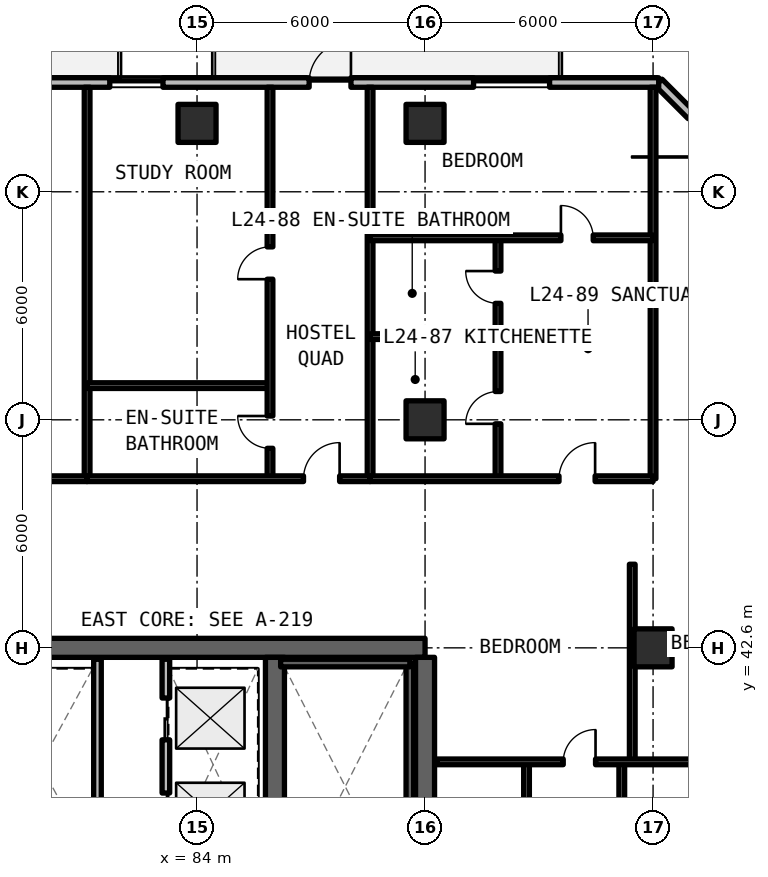
"""IFC4 building model, lengths in metres.
Left out: names, types, materials, properties, quantities, classifications, styles, units other than length and angle.
Written with IfcOpenShell. Run it as: python <this file> out.ifc"""

import sys

from ifc_helpers import new_model, si_unit, direction, frame, frame_2d, origin, origin_2d, place, context, subcontext, project, spatial, rectangle, extrude, element, fill, save


model = new_model("IFC4")
c1 = context("Model", 3, precision=1e-05, world=origin(), true_north=direction((0.0, 1.0)))
c2 = subcontext(c1, "Body", "Model", "MODEL_VIEW")
j1 = project(units=[si_unit("LENGTHUNIT", "METRE"), si_unit("PLANEANGLEUNIT", "RADIAN")], contexts=[c1])
p1 = place(None, origin())
s1 = spatial("IfcSite", under=j1, at=p1, CompositionType="ELEMENT")
p2 = place(p1, origin())
s2 = spatial("IfcBuilding", under=s1, at=p2, CompositionType="ELEMENT")
p3 = place(p2, frame((0.0, 0.0, 88.77)))
s3 = spatial("IfcBuildingStorey", under=s2, at=p3, CompositionType="ELEMENT", Elevation=88.77)
p4 = place(p3, frame((90.0, 42.6, 0.0), z_axis=(0.0, 0.0, 1.0), x_axis=(-1.0, 0.0, 0.0)))
e1 = element("IfcWall", 1, at=p4, inside=s3, PredefinedType="SHEAR", context=c2, shape_type="SweptSolid", body=[
    extrude(rectangle(XDim=12.0, YDim=0.5, at=frame_2d((6.0, 0.0))), origin(), (0.0, 0.0, 1.0), 3.3),
])
p5 = place(p3, frame((90.0, 24.85, 0.0), z_axis=(0.0, 0.0, 1.0), x_axis=(0.0, 1.0, 0.0)))
e2 = element("IfcWall", 2, at=p5, inside=s3, PredefinedType="SHEAR", context=c2, shape_type="SweptSolid", body=[
    extrude(rectangle(XDim=17.5, YDim=0.5, at=frame_2d((8.75, 0.0))), origin(), (0.0, 0.0, 1.0), 3.3),
])
p6 = place(p3, frame((86.05, 24.85, 0.0), z_axis=(0.0, 0.0, 1.0), x_axis=(0.0, 1.0, 0.0)))
e3 = element("IfcWall", 3, at=p6, inside=s3, PredefinedType="SHEAR", context=c2, shape_type="SweptSolid", body=[
    extrude(rectangle(XDim=17.5, YDim=0.5, at=frame_2d((8.75, 0.0))), origin(), (0.0, 0.0, 1.0), 3.3),
])
p7 = place(p6, frame((0.4, 0.0, 0.0)))
e4 = element("IfcOpeningElement", 4, at=p7, cuts=e3, PredefinedType="OPENING", context=c2, shape_type="SweptSolid", body=[
    extrude(rectangle(XDim=1.15, YDim=2.15, at=frame_2d((0.575, 1.075))), frame((0.0, 0.26, 0.0), z_axis=(0.0, -1.0, 0.0), x_axis=(1.0, 0.0, 0.0)), (0.0, 0.0, 1.0), 0.52),
])
p8 = place(p6, frame((9.6, 0.0, 0.0)))
e5 = element("IfcOpeningElement", 5, at=p8, cuts=e3, PredefinedType="OPENING", context=c2, shape_type="SweptSolid", body=[
    extrude(rectangle(XDim=1.15, YDim=2.15, at=frame_2d((0.575, 1.075))), frame((0.0, 0.26, 0.0), z_axis=(0.0, -1.0, 0.0), x_axis=(1.0, 0.0, 0.0)), (0.0, 0.0, 1.0), 0.52),
])
for number, where, z_axis, x_axis in (
    (6, (96.0, 42.6, 0.0), (0.0, 0.0, 1.0), (1.0, 0.0, 0.0)),
    (7, (90.0, 48.6, 0.0), (0.0, 0.0, 1.0), (1.0, 0.0, 0.0)),
    (8, (84.0, 56.4, 0.0), (0.0, 0.0, 1.0), (1.0, 0.0, 0.0)),
    (9, (90.0, 56.4, 0.0), (0.0, 0.0, 1.0), (1.0, 0.0, 0.0)),
):
    element("IfcColumn", number, at=place(p3, frame(where, z_axis=z_axis, x_axis=x_axis)), inside=s3, PredefinedType="COLUMN", context=c2, shape_type="SweptSolid", body=[
        extrude(rectangle(XDim=1.0, YDim=1.0, at=origin_2d()), origin(), (0.0, 0.0, 1.0), 3.3),
    ])
p9 = place(p3, frame((100.275, 53.348, 0.0), z_axis=(0.0, 0.0, 1.0), x_axis=(-0.70708586489, 0.707127696864, 0.0)))
e10 = element("IfcWall", 10, at=p9, inside=s3, PredefinedType="SOLIDWALL", context=c2, shape_type="SweptSolid", body=[
    extrude(rectangle(XDim=5.836, YDim=0.25, at=frame_2d((2.918, 0.0))), origin(), (0.0, 0.0, 1.0), 3.08),
])
p10 = place(p9, frame((1.218, 0.0, 0.78)))
e11 = element("IfcOpeningElement", 11, at=p10, cuts=e10, PredefinedType="OPENING", context=c2, shape_type="SweptSolid", body=[
    extrude(rectangle(XDim=3.4, YDim=1.66, at=frame_2d((1.7, 0.83))), frame((0.0, 0.135, 0.0), z_axis=(0.0, -1.0, 0.0), x_axis=(1.0, 0.0, 0.0)), (0.0, 0.0, 1.0), 0.27),
])
p11 = place(p3, frame((96.148, 57.475, 0.0), z_axis=(0.0, 0.0, 1.0), x_axis=(-1.0, 0.0, 0.0)))
e12 = element("IfcWall", 12, at=p11, inside=s3, PredefinedType="SOLIDWALL", context=c2, shape_type="SweptSolid", body=[
    extrude(rectangle(XDim=44.023, YDim=0.25, at=frame_2d((22.012, 0.0))), origin(), (0.0, 0.0, 1.0), 3.08),
])
p12 = place(p11, frame((27.298, 0.0, 0.0)))
e13 = element("IfcOpeningElement", 13, at=p12, cuts=e12, PredefinedType="OPENING", context=c2, shape_type="SweptSolid", body=[
    extrude(rectangle(XDim=1.1, YDim=2.15, at=frame_2d((0.55, 1.075))), frame((0.0, 0.135, 0.0), z_axis=(0.0, -1.0, 0.0), x_axis=(1.0, 0.0, 0.0)), (0.0, 0.0, 1.0), 0.27),
])
p13 = place(p11, frame((19.948, 0.0, 0.0)))
e14 = element("IfcOpeningElement", 14, at=p13, cuts=e12, PredefinedType="OPENING", context=c2, shape_type="SweptSolid", body=[
    extrude(rectangle(XDim=1.1, YDim=2.15, at=frame_2d((0.55, 1.075))), frame((0.0, 0.135, 0.0), z_axis=(0.0, -1.0, 0.0), x_axis=(1.0, 0.0, 0.0)), (0.0, 0.0, 1.0), 0.27),
])
p14 = place(p11, frame((8.098, 0.0, 0.0)))
e15 = element("IfcOpeningElement", 15, at=p14, cuts=e12, PredefinedType="OPENING", context=c2, shape_type="SweptSolid", body=[
    extrude(rectangle(XDim=1.1, YDim=2.15, at=frame_2d((0.55, 1.075))), frame((0.0, 0.135, 0.0), z_axis=(0.0, -1.0, 0.0), x_axis=(1.0, 0.0, 0.0)), (0.0, 0.0, 1.0), 0.27),
])
p15 = place(p11, frame((39.336, 0.0, 0.78)))
e16 = element("IfcOpeningElement", 16, at=p15, cuts=e12, PredefinedType="OPENING", context=c2, shape_type="SweptSolid", body=[
    extrude(rectangle(XDim=2.0, YDim=1.66, at=frame_2d((1.0, 0.83))), frame((0.0, 0.135, 0.0), z_axis=(0.0, -1.0, 0.0), x_axis=(1.0, 0.0, 0.0)), (0.0, 0.0, 1.0), 0.27),
])
p16 = place(p11, frame((33.345, 0.0, 0.78)))
e17 = element("IfcOpeningElement", 17, at=p16, cuts=e12, PredefinedType="OPENING", context=c2, shape_type="SweptSolid", body=[
    extrude(rectangle(XDim=2.0, YDim=1.66, at=frame_2d((1.0, 0.83))), frame((0.0, 0.135, 0.0), z_axis=(0.0, -1.0, 0.0), x_axis=(1.0, 0.0, 0.0)), (0.0, 0.0, 1.0), 0.27),
])
p17 = place(p11, frame((13.044, 0.0, 0.78)))
e18 = element("IfcOpeningElement", 18, at=p17, cuts=e12, PredefinedType="OPENING", context=c2, shape_type="SweptSolid", body=[
    extrude(rectangle(XDim=1.4, YDim=1.65, at=frame_2d((0.7, 0.825))), frame((0.0, 0.135, 0.0), z_axis=(0.0, -1.0, 0.0), x_axis=(1.0, 0.0, 0.0)), (0.0, 0.0, 1.0), 0.27),
])
p18 = place(p11, frame((2.871, 0.0, 0.78)))
e19 = element("IfcOpeningElement", 19, at=p18, cuts=e12, PredefinedType="OPENING", context=c2, shape_type="SweptSolid", body=[
    extrude(rectangle(XDim=2.0, YDim=1.66, at=frame_2d((1.0, 0.83))), frame((0.0, 0.135, 0.0), z_axis=(0.0, -1.0, 0.0), x_axis=(1.0, 0.0, 0.0)), (0.0, 0.0, 1.0), 0.27),
])
p19 = place(p3, frame((83.18, 36.88, 0.0), z_axis=(0.0, 0.0, 1.0), x_axis=(0.0, 1.0, 0.0)))
e20 = element("IfcWall", 20, at=p19, inside=s3, PredefinedType="SOLIDWALL", context=c2, shape_type="SweptSolid", body=[
    extrude(rectangle(XDim=5.42, YDim=0.2, at=frame_2d((2.71, 0.0))), origin(), (0.0, 0.0, 1.0), 2.35),
])
p20 = place(p19, frame((0.8, 0.0, 0.0)))
e21 = element("IfcOpeningElement", 21, at=p20, cuts=e20, PredefinedType="OPENING", context=c2, shape_type="SweptSolid", body=[
    extrude(rectangle(XDim=1.1, YDim=2.2, at=frame_2d((0.55, 1.1))), frame((0.0, 0.11, 0.0), z_axis=(0.0, -1.0, 0.0), x_axis=(1.0, 0.0, 0.0)), (0.0, 0.0, 1.0), 0.22),
])
p21 = place(p19, frame((3.3, 0.0, 0.0)))
e22 = element("IfcOpeningElement", 22, at=p21, cuts=e20, PredefinedType="OPENING", context=c2, shape_type="SweptSolid", body=[
    extrude(rectangle(XDim=1.1, YDim=2.2, at=frame_2d((0.55, 1.1))), frame((0.0, 0.11, 0.0), z_axis=(0.0, -1.0, 0.0), x_axis=(1.0, 0.0, 0.0)), (0.0, 0.0, 1.0), 0.22),
])
p22 = place(p3, frame((81.38, 36.88, 0.0), z_axis=(0.0, 0.0, 1.0), x_axis=(0.0, 1.0, 0.0)))
e23 = element("IfcWall", 23, at=p22, inside=s3, PredefinedType="SOLIDWALL", context=c2, shape_type="SweptSolid", body=[
    extrude(rectangle(XDim=5.42, YDim=0.2, at=frame_2d((2.71, 0.0))), origin(), (0.0, 0.0, 1.0), 2.35),
])
p23 = place(p3, frame((95.177, 22.4, 0.0), z_axis=(0.0, 0.0, 1.0), x_axis=(0.0, 1.0, 0.0)))
e24 = element("IfcWall", 24, at=p23, inside=s3, PredefinedType="PARTITIONING", context=c2, shape_type="SweptSolid", body=[
    extrude(rectangle(XDim=17.2, YDim=0.15, at=frame_2d((8.6, 0.0))), origin(), (0.0, 0.0, 1.0), 2.35),
])
p24 = place(p23, frame((8.175, 0.0, 0.0)))
e25 = element("IfcOpeningElement", 25, at=p24, cuts=e24, PredefinedType="OPENING", context=c2, shape_type="SweptSolid", body=[
    extrude(rectangle(XDim=0.85, YDim=2.1, at=frame_2d((0.425, 1.05))), frame((0.0, 0.085, 0.0), z_axis=(0.0, -1.0, 0.0), x_axis=(1.0, 0.0, 0.0)), (0.0, 0.0, 1.0), 0.17),
])
p25 = place(p3, frame((92.67, 22.4, 0.0), z_axis=(0.0, 0.0, 1.0), x_axis=(0.0, 1.0, 0.0)))
e26 = element("IfcWall", 26, at=p25, inside=s3, PredefinedType="PARTITIONING", context=c2, shape_type="SweptSolid", body=[
    extrude(rectangle(XDim=17.2, YDim=0.15, at=frame_2d((8.6, 0.0))), origin(), (0.0, 0.0, 1.0), 2.35),
])
p26 = place(p25, frame((4.649, 0.0, 0.0)))
e27 = element("IfcOpeningElement", 27, at=p26, cuts=e26, PredefinedType="OPENING", context=c2, shape_type="SweptSolid", body=[
    extrude(rectangle(XDim=0.85, YDim=2.1, at=frame_2d((0.425, 1.05))), frame((0.0, 0.085, 0.0), z_axis=(0.0, -1.0, 0.0), x_axis=(1.0, 0.0, 0.0)), (0.0, 0.0, 1.0), 0.17),
])
p27 = place(p25, frame((13.249, 0.0, 0.0)))
e28 = element("IfcOpeningElement", 28, at=p27, cuts=e26, PredefinedType="OPENING", context=c2, shape_type="SweptSolid", body=[
    extrude(rectangle(XDim=0.85, YDim=2.1, at=frame_2d((0.425, 1.05))), frame((0.0, 0.085, 0.0), z_axis=(0.0, -1.0, 0.0), x_axis=(1.0, 0.0, 0.0)), (0.0, 0.0, 1.0), 0.17),
])
p28 = place(p3, frame((95.452, 39.6, 0.0), z_axis=(0.0, 0.0, 1.0), x_axis=(0.0, 1.0, 0.0)))
e29 = element("IfcWall", 29, at=p28, inside=s3, PredefinedType="PARTITIONING", context=c2, shape_type="SweptSolid", body=[
    extrude(rectangle(XDim=5.2, YDim=0.15, at=frame_2d((2.6, 0.0))), origin(), (0.0, 0.0, 1.0), 2.35),
])
p29 = place(p3, frame((90.32, 39.6, 0.0), z_axis=(0.0, 0.0, 1.0), x_axis=(1.0, 0.0, 0.0)))
e30 = element("IfcWall", 30, at=p29, inside=s3, PredefinedType="PARTITIONING", context=c2, shape_type="SweptSolid", body=[
    extrude(rectangle(XDim=9.87, YDim=0.15, at=frame_2d((4.935, 0.0))), origin(), (0.0, 0.0, 1.0), 2.35),
])
p30 = place(p29, frame((3.316, 0.0, 0.0)))
e31 = element("IfcOpeningElement", 31, at=p30, cuts=e30, PredefinedType="OPENING", context=c2, shape_type="SweptSolid", body=[
    extrude(rectangle(XDim=0.85, YDim=2.1, at=frame_2d((0.425, 1.05))), frame((0.0, 0.085, 0.0), z_axis=(0.0, -1.0, 0.0), x_axis=(1.0, 0.0, 0.0)), (0.0, 0.0, 1.0), 0.17),
])
p31 = place(p29, frame((7.876, 0.0, 0.0)))
e32 = element("IfcOpeningElement", 32, at=p31, cuts=e30, PredefinedType="OPENING", context=c2, shape_type="SweptSolid", body=[
    extrude(rectangle(XDim=0.85, YDim=2.1, at=frame_2d((0.425, 1.05))), frame((0.0, 0.085, 0.0), z_axis=(0.0, -1.0, 0.0), x_axis=(1.0, 0.0, 0.0)), (0.0, 0.0, 1.0), 0.17),
])
for number, where, z_axis, x_axis in (
    (33, (96.0, 47.05, 0.0), (0.0, 0.0, 1.0), (0.0, 1.0, 0.0)),
    (34, (81.107, 47.05, 0.0), (0.0, 0.0, 1.0), (0.0, 1.0, 0.0)),
):
    element("IfcWall", number, at=place(p3, frame(where, z_axis=z_axis, x_axis=x_axis)), inside=s3, PredefinedType="SOLIDWALL", context=c2, shape_type="SweptSolid", body=[
        extrude(rectangle(XDim=10.3, YDim=0.15, at=frame_2d((5.15, 0.0))), origin(), (0.0, 0.0, 1.0), 2.35),
    ])
p32 = place(p3, frame((71.268, 47.05, 0.0), z_axis=(0.0, 0.0, 1.0), x_axis=(1.0, 0.0, 0.0)))
e35 = element("IfcWall", 35, at=p32, inside=s3, PredefinedType="SOLIDWALL", context=c2, shape_type="SweptSolid", body=[
    extrude(rectangle(XDim=9.84, YDim=0.15, at=frame_2d((4.92, 0.0))), origin(), (0.0, 0.0, 1.0), 2.35),
])
p33 = place(p32, frame((4.37, 0.0, 0.0)))
e36 = element("IfcOpeningElement", 36, at=p33, cuts=e35, PredefinedType="OPENING", context=c2, shape_type="SweptSolid", body=[
    extrude(rectangle(XDim=1.1, YDim=2.15, at=frame_2d((0.55, 1.075))), frame((0.0, 0.085, 0.0), z_axis=(0.0, -1.0, 0.0), x_axis=(1.0, 0.0, 0.0)), (0.0, 0.0, 1.0), 0.17),
])
p34 = place(p3, frame((88.554, 47.05, 0.0), z_axis=(0.0, 0.0, 1.0), x_axis=(0.0, 1.0, 0.0)))
e37 = element("IfcWall", 37, at=p34, inside=s3, PredefinedType="SOLIDWALL", context=c2, shape_type="SweptSolid", body=[
    extrude(rectangle(XDim=10.3, YDim=0.15, at=frame_2d((5.15, 0.0))), origin(), (0.0, 0.0, 1.0), 2.35),
])
p35 = place(p3, frame((81.107, 49.5, 0.0), z_axis=(0.0, 0.0, 1.0), x_axis=(1.0, 0.0, 0.0)))
e38 = element("IfcWall", 38, at=p35, inside=s3, PredefinedType="PARTITIONING", context=c2, shape_type="SweptSolid", body=[
    extrude(rectangle(XDim=4.812, YDim=0.15, at=frame_2d((2.406, 0.0))), origin(), (0.0, 0.0, 1.0), 2.35),
])
p36 = place(p3, frame((85.92, 47.05, 0.0), z_axis=(0.0, 0.0, 1.0), x_axis=(0.0, 1.0, 0.0)))
e39 = element("IfcWall", 39, at=p36, inside=s3, PredefinedType="PARTITIONING", context=c2, shape_type="SweptSolid", body=[
    extrude(rectangle(XDim=10.3, YDim=0.15, at=frame_2d((5.15, 0.0))), origin(), (0.0, 0.0, 1.0), 2.35),
])
p37 = place(p36, frame((0.8, 0.0, 0.0)))
e40 = element("IfcOpeningElement", 40, at=p37, cuts=e39, PredefinedType="OPENING", context=c2, shape_type="SweptSolid", body=[
    extrude(rectangle(XDim=0.85, YDim=2.1, at=frame_2d((0.425, 1.05))), frame((0.0, 0.085, 0.0), z_axis=(0.0, -1.0, 0.0), x_axis=(1.0, 0.0, 0.0)), (0.0, 0.0, 1.0), 0.17),
])
p38 = place(p36, frame((5.25, 0.0, 0.0)))
e41 = element("IfcOpeningElement", 41, at=p38, cuts=e39, PredefinedType="OPENING", context=c2, shape_type="SweptSolid", body=[
    extrude(rectangle(XDim=0.85, YDim=2.1, at=frame_2d((0.425, 1.05))), frame((0.0, 0.085, 0.0), z_axis=(0.0, -1.0, 0.0), x_axis=(1.0, 0.0, 0.0)), (0.0, 0.0, 1.0), 0.17),
])
p39 = place(p3, frame((81.107, 47.05, 0.0), z_axis=(0.0, 0.0, 1.0), x_axis=(1.0, 0.0, 0.0)))
e42 = element("IfcWall", 42, at=p39, inside=s3, PredefinedType="SOLIDWALL", context=c2, shape_type="SweptSolid", body=[
    extrude(rectangle(XDim=7.446, YDim=0.15, at=frame_2d((3.723, 0.0))), origin(), (0.0, 0.0, 1.0), 2.35),
])
p40 = place(p39, frame((5.694, 0.0, 0.0)))
e43 = element("IfcOpeningElement", 43, at=p40, cuts=e42, PredefinedType="OPENING", context=c2, shape_type="SweptSolid", body=[
    extrude(rectangle(XDim=0.95, YDim=2.15, at=frame_2d((0.475, 1.075))), frame((0.0, 0.085, 0.0), z_axis=(0.0, -1.0, 0.0), x_axis=(1.0, 0.0, 0.0)), (0.0, 0.0, 1.0), 0.17),
])
p41 = place(p3, frame((88.554, 50.79, 0.0), z_axis=(0.0, 0.0, 1.0), x_axis=(1.0, 0.0, 0.0)))
e44 = element("IfcWall", 44, at=p41, inside=s3, PredefinedType="PARTITIONING", context=c2, shape_type="SweptSolid", body=[
    extrude(rectangle(XDim=3.366, YDim=0.15, at=frame_2d((1.683, 0.0))), origin(), (0.0, 0.0, 1.0), 2.35),
])
p42 = place(p3, frame((91.92, 47.05, 0.0), z_axis=(0.0, 0.0, 1.0), x_axis=(0.0, 1.0, 0.0)))
e45 = element("IfcWall", 45, at=p42, inside=s3, PredefinedType="PARTITIONING", context=c2, shape_type="SweptSolid", body=[
    extrude(rectangle(XDim=6.338, YDim=0.15, at=frame_2d((3.169, 0.0))), origin(), (0.0, 0.0, 1.0), 2.35),
])
p43 = place(p42, frame((1.445, 0.0, 0.0)))
e46 = element("IfcOpeningElement", 46, at=p43, cuts=e45, PredefinedType="OPENING", context=c2, shape_type="SweptSolid", body=[
    extrude(rectangle(XDim=0.85, YDim=2.1, at=frame_2d((0.425, 1.05))), frame((0.0, 0.085, 0.0), z_axis=(0.0, -1.0, 0.0), x_axis=(1.0, 0.0, 0.0)), (0.0, 0.0, 1.0), 0.17),
])
p44 = place(p42, frame((4.614, 0.0, 0.0)))
e47 = element("IfcOpeningElement", 47, at=p44, cuts=e45, PredefinedType="OPENING", context=c2, shape_type="SweptSolid", body=[
    extrude(rectangle(XDim=0.85, YDim=2.1, at=frame_2d((0.425, 1.05))), frame((0.0, 0.085, 0.0), z_axis=(0.0, -1.0, 0.0), x_axis=(1.0, 0.0, 0.0)), (0.0, 0.0, 1.0), 0.17),
])
p45 = place(p3, frame((88.554, 53.388, 0.0), z_axis=(0.0, 0.0, 1.0), x_axis=(1.0, 0.0, 0.0)))
e48 = element("IfcWall", 48, at=p45, inside=s3, PredefinedType="PARTITIONING", context=c2, shape_type="SweptSolid", body=[
    extrude(rectangle(XDim=7.446, YDim=0.15, at=frame_2d((3.723, 0.0))), origin(), (0.0, 0.0, 1.0), 2.35),
])
p46 = place(p45, frame((5.021, 0.0, 0.0)))
e49 = element("IfcOpeningElement", 49, at=p46, cuts=e48, PredefinedType="OPENING", context=c2, shape_type="SweptSolid", body=[
    extrude(rectangle(XDim=0.85, YDim=2.1, at=frame_2d((0.425, 1.05))), frame((0.0, 0.085, 0.0), z_axis=(0.0, -1.0, 0.0), x_axis=(1.0, 0.0, 0.0)), (0.0, 0.0, 1.0), 0.17),
])
p47 = place(p3, frame((88.554, 47.05, 0.0), z_axis=(0.0, 0.0, 1.0), x_axis=(1.0, 0.0, 0.0)))
e50 = element("IfcWall", 50, at=p47, inside=s3, PredefinedType="SOLIDWALL", context=c2, shape_type="SweptSolid", body=[
    extrude(rectangle(XDim=7.446, YDim=0.15, at=frame_2d((3.723, 0.0))), origin(), (0.0, 0.0, 1.0), 2.35),
])
p48 = place(p47, frame((4.971, 0.0, 0.0)))
e51 = element("IfcOpeningElement", 51, at=p48, cuts=e50, PredefinedType="OPENING", context=c2, shape_type="SweptSolid", body=[
    extrude(rectangle(XDim=0.95, YDim=2.15, at=frame_2d((0.475, 1.075))), frame((0.0, 0.085, 0.0), z_axis=(0.0, -1.0, 0.0), x_axis=(1.0, 0.0, 0.0)), (0.0, 0.0, 1.0), 0.17),
])
p49 = place(p3, frame((89.6, 34.2, 0.0), z_axis=(0.0, 0.0, 1.0), x_axis=(0.0, 1.0, 0.0)))
e52 = element("IfcWall", 52, at=p49, inside=s3, PredefinedType="SOLIDWALL", context=c2, shape_type="SweptSolid", body=[
    extrude(rectangle(XDim=8.0, YDim=0.2, at=frame_2d((4.0, 0.0))), origin(), (0.0, 0.0, 1.0), 3.3),
])
p50 = place(p3, frame((89.6, 42.2, 0.0), z_axis=(0.0, 0.0, 1.0), x_axis=(-1.0, 0.0, 0.0)))
e53 = element("IfcWall", 53, at=p50, inside=s3, PredefinedType="SOLIDWALL", context=c2, shape_type="SweptSolid", body=[
    extrude(rectangle(XDim=3.4, YDim=0.2, at=frame_2d((1.7, 0.0))), origin(), (0.0, 0.0, 1.0), 3.3),
])
p51 = place(p14, frame((1.1, 0.0, 0.0), z_axis=(0.0, 0.0, 1.0), x_axis=(-1.0, 0.0, 0.0)))
e54 = element("IfcDoor", 54, at=p51, inside=s3, OperationType="SINGLE_SWING_LEFT", PredefinedType="DOOR", context=c2, shape_type="SweptSolid", body=[
    extrude(rectangle(XDim=1.1, YDim=2.15, at=frame_2d((0.55, 1.075))), frame((0.0, 0.025, 0.0), z_axis=(0.0, -1.0, 0.0), x_axis=(1.0, 0.0, 0.0)), (0.0, 0.0, 1.0), 0.05),
])
fill(e15, e54)
p52 = place(p17, origin())
e55 = element("IfcWindow", 55, at=p52, inside=s3, PartitioningType="SINGLE_PANEL", PredefinedType="WINDOW", context=c2, shape_type="SweptSolid", body=[
    extrude(rectangle(XDim=1.4, YDim=1.65, at=frame_2d((0.7, 0.825))), frame((0.0, 0.03, 0.0), z_axis=(0.0, -1.0, 0.0), x_axis=(1.0, 0.0, 0.0)), (0.0, 0.0, 1.0), 0.06),
])
fill(e18, e55)
p53 = place(p18, origin())
e56 = element("IfcWindow", 56, at=p53, inside=s3, PartitioningType="SINGLE_PANEL", PredefinedType="WINDOW", context=c2, shape_type="SweptSolid", body=[
    extrude(rectangle(XDim=2.0, YDim=1.66, at=frame_2d((1.0, 0.83))), frame((0.0, 0.03, 0.0), z_axis=(0.0, -1.0, 0.0), x_axis=(1.0, 0.0, 0.0)), (0.0, 0.0, 1.0), 0.06),
])
fill(e19, e56)
p54 = place(p20, origin())
e57 = element("IfcDoor", 57, at=p54, inside=s3, OperationType="SLIDING_TO_LEFT", PredefinedType="DOOR", context=c2, shape_type="SweptSolid", body=[
    extrude(rectangle(XDim=1.1, YDim=2.2, at=frame_2d((0.55, 1.1))), frame((0.0, 0.025, 0.0), z_axis=(0.0, -1.0, 0.0), x_axis=(1.0, 0.0, 0.0)), (0.0, 0.0, 1.0), 0.05),
])
fill(e21, e57)
p55 = place(p21, origin())
e58 = element("IfcDoor", 58, at=p55, inside=s3, OperationType="SLIDING_TO_RIGHT", PredefinedType="DOOR", context=c2, shape_type="SweptSolid", body=[
    extrude(rectangle(XDim=1.1, YDim=2.2, at=frame_2d((0.55, 1.1))), frame((0.0, 0.025, 0.0), z_axis=(0.0, -1.0, 0.0), x_axis=(1.0, 0.0, 0.0)), (0.0, 0.0, 1.0), 0.05),
])
fill(e22, e58)
p56 = place(p30, origin())
e59 = element("IfcDoor", 59, at=p56, inside=s3, OperationType="SINGLE_SWING_RIGHT", PredefinedType="DOOR", context=c2, shape_type="SweptSolid", body=[
    extrude(rectangle(XDim=0.85, YDim=2.1, at=frame_2d((0.425, 1.05))), frame((0.0, 0.025, 0.0), z_axis=(0.0, -1.0, 0.0), x_axis=(1.0, 0.0, 0.0)), (0.0, 0.0, 1.0), 0.05),
])
fill(e31, e59)
p57 = place(p37, origin())
e60 = element("IfcDoor", 60, at=p57, inside=s3, OperationType="SINGLE_SWING_RIGHT", PredefinedType="DOOR", context=c2, shape_type="SweptSolid", body=[
    extrude(rectangle(XDim=0.85, YDim=2.1, at=frame_2d((0.425, 1.05))), frame((0.0, 0.025, 0.0), z_axis=(0.0, -1.0, 0.0), x_axis=(1.0, 0.0, 0.0)), (0.0, 0.0, 1.0), 0.05),
])
fill(e40, e60)
p58 = place(p38, origin())
e61 = element("IfcDoor", 61, at=p58, inside=s3, OperationType="SINGLE_SWING_LEFT", PredefinedType="DOOR", context=c2, shape_type="SweptSolid", body=[
    extrude(rectangle(XDim=0.85, YDim=2.1, at=frame_2d((0.425, 1.05))), frame((0.0, 0.025, 0.0), z_axis=(0.0, -1.0, 0.0), x_axis=(1.0, 0.0, 0.0)), (0.0, 0.0, 1.0), 0.05),
])
fill(e41, e61)
p59 = place(p40, origin())
e62 = element("IfcDoor", 62, at=p59, inside=s3, OperationType="SINGLE_SWING_RIGHT", PredefinedType="DOOR", context=c2, shape_type="SweptSolid", body=[
    extrude(rectangle(XDim=0.95, YDim=2.15, at=frame_2d((0.475, 1.075))), frame((0.0, 0.025, 0.0), z_axis=(0.0, -1.0, 0.0), x_axis=(1.0, 0.0, 0.0)), (0.0, 0.0, 1.0), 0.05),
])
fill(e43, e62)
p60 = place(p43, origin())
e63 = element("IfcDoor", 63, at=p60, inside=s3, OperationType="SINGLE_SWING_LEFT", PredefinedType="DOOR", context=c2, shape_type="SweptSolid", body=[
    extrude(rectangle(XDim=0.85, YDim=2.1, at=frame_2d((0.425, 1.05))), frame((0.0, 0.025, 0.0), z_axis=(0.0, -1.0, 0.0), x_axis=(1.0, 0.0, 0.0)), (0.0, 0.0, 1.0), 0.05),
])
fill(e46, e63)
p61 = place(p44, origin())
e64 = element("IfcDoor", 64, at=p61, inside=s3, OperationType="SINGLE_SWING_RIGHT", PredefinedType="DOOR", context=c2, shape_type="SweptSolid", body=[
    extrude(rectangle(XDim=0.85, YDim=2.1, at=frame_2d((0.425, 1.05))), frame((0.0, 0.025, 0.0), z_axis=(0.0, -1.0, 0.0), x_axis=(1.0, 0.0, 0.0)), (0.0, 0.0, 1.0), 0.05),
])
fill(e47, e64)
p62 = place(p46, origin())
e65 = element("IfcDoor", 65, at=p62, inside=s3, OperationType="SINGLE_SWING_LEFT", PredefinedType="DOOR", context=c2, shape_type="SweptSolid", body=[
    extrude(rectangle(XDim=0.85, YDim=2.1, at=frame_2d((0.425, 1.05))), frame((0.0, 0.025, 0.0), z_axis=(0.0, -1.0, 0.0), x_axis=(1.0, 0.0, 0.0)), (0.0, 0.0, 1.0), 0.05),
])
fill(e49, e65)
p63 = place(p48, origin())
e66 = element("IfcDoor", 66, at=p63, inside=s3, OperationType="SINGLE_SWING_RIGHT", PredefinedType="DOOR", context=c2, shape_type="SweptSolid", body=[
    extrude(rectangle(XDim=0.95, YDim=2.15, at=frame_2d((0.475, 1.075))), frame((0.0, 0.025, 0.0), z_axis=(0.0, -1.0, 0.0), x_axis=(1.0, 0.0, 0.0)), (0.0, 0.0, 1.0), 0.05),
])
fill(e51, e66)
save(model, sys.argv[1])
